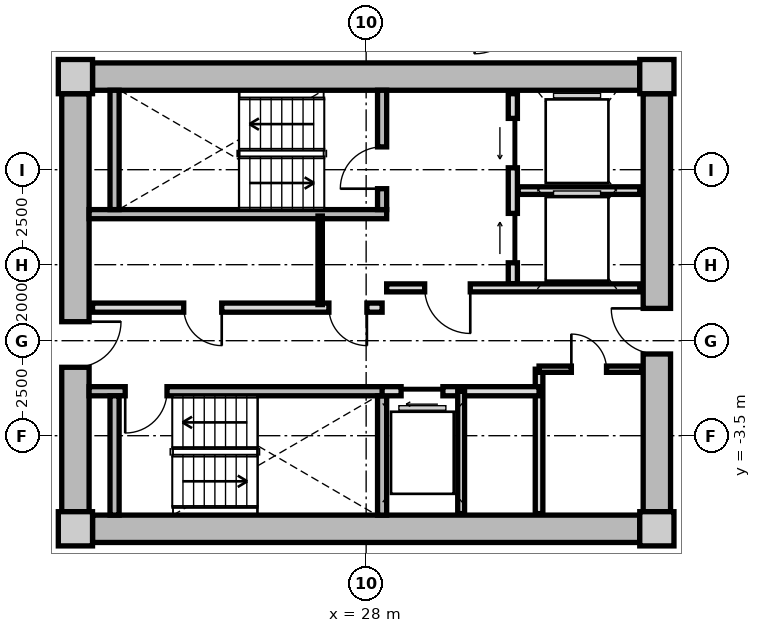
"""IFC4 building model, lengths in metres.
Left out: names, types, materials, properties, quantities, classifications, styles, units other than length and angle.
Written with IfcOpenShell. Run it as: python <this file> out.ifc"""

import sys

from ifc_helpers import new_model, si_unit, direction, frame, frame_2d, origin, origin_2d, place, context, subcontext, project, spatial, rectangle, extrude, source, transform, mapped, element, fill, save


model = new_model("IFC4")
c1 = context("Model", 3, precision=1e-05, world=origin(), true_north=direction((0.0, 1.0)))
c2 = subcontext(c1, "Body", "Model", "MODEL_VIEW")
j1 = project(units=[si_unit("LENGTHUNIT", "METRE"), si_unit("PLANEANGLEUNIT", "RADIAN")], contexts=[c1])
p1 = place(None, origin())
s1 = spatial("IfcSite", under=j1, at=p1, CompositionType="ELEMENT")
p2 = place(p1, origin())
s2 = spatial("IfcBuilding", under=s1, at=p2, CompositionType="ELEMENT")
p3 = place(p2, frame((0.0, 0.0, 120.65)))
s3 = spatial("IfcBuildingStorey", under=s2, at=p3, CompositionType="ELEMENT", Elevation=120.65)
m1 = source(origin(), c2, "Body", "SweptSolid", [
    extrude(rectangle(XDim=0.9, YDim=0.9, at=origin_2d()), origin(), (0.0, 0.0, 1.0), 3.05),
])
for number, where, z_axis, x_axis in (
    (1, (20.35, -5.95, 0.0), (0.0, 0.0, 1.0), (1.0, 0.0, 0.0)),
    (2, (35.65, -5.95, 0.0), (0.0, 0.0, 1.0), (1.0, 0.0, 0.0)),
    (3, (35.65, 5.95, 0.0), (0.0, 0.0, 1.0), (1.0, 0.0, 0.0)),
    (4, (20.35, 5.95, 0.0), (0.0, 0.0, 1.0), (1.0, 0.0, 0.0)),
):
    element("IfcColumn", number, at=place(p3, frame(where, z_axis=z_axis, x_axis=x_axis)), inside=s3, PredefinedType="COLUMN", context=c2, shape_type="MappedRepresentation", body=[
        mapped(m1, transform((0.0, 0.0, 0.0), x_axis=(1.0, 0.0, 0.0), y_axis=(0.0, 1.0, 0.0), z_axis=(0.0, 0.0, 1.0), scale=1.0)),
    ])
m2 = source(origin(), c2, "Body", "SweptSolid", [
    extrude(rectangle(XDim=14.4, YDim=0.72, at=frame_2d((7.2, 0.0))), origin(), (0.0, 0.0, 1.0), 2.79),
])
for number, where, z_axis, x_axis in (
    (5, (20.8, 5.95, 0.0), (0.0, 0.0, 1.0), (1.0, 0.0, 0.0)),
    (6, (35.2, -5.95, 0.0), (0.0, 0.0, 1.0), (-1.0, 0.0, 0.0)),
):
    element("IfcWall", number, at=place(p3, frame(where, z_axis=z_axis, x_axis=x_axis)), inside=s3, PredefinedType="SHEAR", context=c2, shape_type="MappedRepresentation", body=[
        mapped(m2, transform((0.0, 0.0, 0.0), x_axis=(1.0, 0.0, 0.0), y_axis=(0.0, 1.0, 0.0), z_axis=(0.0, 0.0, 1.0), scale=1.0)),
    ])
m3 = source(origin(), c2, "Body", "SweptSolid", [
    extrude(rectangle(XDim=11.0, YDim=0.72, at=frame_2d((5.5, 0.0))), origin(), (0.0, 0.0, 1.0), 2.79),
])
p4 = place(p3, frame((20.35, -5.5, 0.0), z_axis=(0.0, 0.0, 1.0), x_axis=(0.0, 1.0, 0.0)))
e7 = element("IfcWall", 7, at=p4, inside=s3, PredefinedType="SHEAR", context=c2, shape_type="MappedRepresentation", body=[
    mapped(m3, transform((0.0, 0.0, 0.0), x_axis=(1.0, 0.0, 0.0), y_axis=(0.0, 1.0, 0.0), z_axis=(0.0, 0.0, 1.0), scale=1.0)),
])
p5 = place(p4, frame((3.8, 0.0, 0.0)))
e8 = element("IfcOpeningElement", 8, at=p5, cuts=e7, PredefinedType="OPENING", context=c2, shape_type="SweptSolid", body=[
    extrude(rectangle(XDim=1.2, YDim=2.15, at=frame_2d((0.6, 1.075))), frame((0.0, 0.37, 0.0), z_axis=(0.0, -1.0, 0.0), x_axis=(1.0, 0.0, 0.0)), (0.0, 0.0, 1.0), 0.74),
])
p6 = place(p3, frame((35.65, 5.5, 0.0), z_axis=(0.0, 0.0, 1.0), x_axis=(0.0, -1.0, 0.0)))
e9 = element("IfcWall", 9, at=p6, inside=s3, PredefinedType="SHEAR", context=c2, shape_type="MappedRepresentation", body=[
    mapped(m3, transform((0.0, 0.0, 0.0), x_axis=(1.0, 0.0, 0.0), y_axis=(0.0, 1.0, 0.0), z_axis=(0.0, 0.0, 1.0), scale=1.0)),
])
p7 = place(p6, frame((5.65, 0.0, 0.0)))
e10 = element("IfcOpeningElement", 10, at=p7, cuts=e9, PredefinedType="OPENING", context=c2, shape_type="SweptSolid", body=[
    extrude(rectangle(XDim=1.2, YDim=2.15, at=frame_2d((0.6, 1.075))), frame((0.0, 0.37, 0.0), z_axis=(0.0, -1.0, 0.0), x_axis=(1.0, 0.0, 0.0)), (0.0, 0.0, 1.0), 0.74),
])
m4 = source(origin(), c2, "Body", "SweptSolid", [
    extrude(rectangle(XDim=7.83, YDim=0.24, at=frame_2d((3.915, 0.0))), origin(), (0.0, 0.0, 1.0), 2.79),
])
p8 = place(p3, frame((20.71, 2.33, 0.0), z_axis=(0.0, 0.0, 1.0), x_axis=(1.0, 0.0, 0.0)))
e11 = element("IfcWall", 11, at=p8, inside=s3, PredefinedType="PARTITIONING", context=c2, shape_type="MappedRepresentation", body=[
    mapped(m4, transform((0.0, 0.0, 0.0), x_axis=(1.0, 0.0, 0.0), y_axis=(0.0, 1.0, 0.0), z_axis=(0.0, 0.0, 1.0), scale=1.0)),
])
m5 = source(origin(), c2, "Body", "SweptSolid", [
    extrude(rectangle(XDim=3.14, YDim=0.24, at=frame_2d((1.57, 0.0))), origin(), (0.0, 0.0, 1.0), 2.79),
])
p9 = place(p3, frame((21.38, 2.45, 0.0), z_axis=(0.0, 0.0, 1.0), x_axis=(0.0, 1.0, 0.0)))
e12 = element("IfcWall", 12, at=p9, inside=s3, PredefinedType="PARTITIONING", context=c2, shape_type="MappedRepresentation", body=[
    mapped(m5, transform((0.0, 0.0, 0.0), x_axis=(1.0, 0.0, 0.0), y_axis=(0.0, 1.0, 0.0), z_axis=(0.0, 0.0, 1.0), scale=1.0)),
])
p10 = place(p3, frame((28.42, 2.45, 0.0), z_axis=(0.0, 0.0, 1.0), x_axis=(0.0, 1.0, 0.0)))
e13 = element("IfcWall", 13, at=p10, inside=s3, PredefinedType="PARTITIONING", context=c2, shape_type="MappedRepresentation", body=[
    mapped(m5, transform((0.0, 0.0, 0.0), x_axis=(1.0, 0.0, 0.0), y_axis=(0.0, 1.0, 0.0), z_axis=(0.0, 0.0, 1.0), scale=1.0)),
])
p11 = place(p10, frame((0.55, 0.0, 0.0)))
e14 = element("IfcOpeningElement", 14, at=p11, cuts=e13, PredefinedType="OPENING", context=c2, shape_type="SweptSolid", body=[
    extrude(rectangle(XDim=1.1, YDim=2.15, at=frame_2d((0.55, 1.075))), frame((0.0, 0.13, 0.0), z_axis=(0.0, -1.0, 0.0), x_axis=(1.0, 0.0, 0.0)), (0.0, 0.0, 1.0), 0.26),
])
p12 = place(p3, frame((20.71, -2.33, 0.0), z_axis=(0.0, 0.0, 1.0), x_axis=(1.0, 0.0, 0.0)))
e15 = element("IfcWall", 15, at=p12, inside=s3, PredefinedType="PARTITIONING", context=c2, shape_type="MappedRepresentation", body=[
    mapped(m4, transform((0.0, 0.0, 0.0), x_axis=(1.0, 0.0, 0.0), y_axis=(0.0, 1.0, 0.0), z_axis=(0.0, 0.0, 1.0), scale=1.0)),
])
p13 = place(p12, frame((0.95, 0.0, 0.0)))
e16 = element("IfcOpeningElement", 16, at=p13, cuts=e15, PredefinedType="OPENING", context=c2, shape_type="SweptSolid", body=[
    extrude(rectangle(XDim=1.1, YDim=2.15, at=frame_2d((0.55, 1.075))), frame((0.0, 0.13, 0.0), z_axis=(0.0, -1.0, 0.0), x_axis=(1.0, 0.0, 0.0)), (0.0, 0.0, 1.0), 0.26),
])
for number, where, z_axis, x_axis in (
    (17, (21.38, -5.59, 0.0), (0.0, 0.0, 1.0), (0.0, 1.0, 0.0)),
    (18, (28.42, -5.59, 0.0), (0.0, 0.0, 1.0), (0.0, 1.0, 0.0)),
):
    element("IfcWall", number, at=place(p3, frame(where, z_axis=z_axis, x_axis=x_axis)), inside=s3, PredefinedType="PARTITIONING", context=c2, shape_type="MappedRepresentation", body=[
        mapped(m5, transform((0.0, 0.0, 0.0), x_axis=(1.0, 0.0, 0.0), y_axis=(0.0, 1.0, 0.0), z_axis=(0.0, 0.0, 1.0), scale=1.0)),
    ])
m6 = source(origin(), c2, "Body", "SweptSolid", [
    extrude(rectangle(XDim=5.0, YDim=0.24, at=frame_2d((2.5, 0.0))), origin(), (0.0, 0.0, 1.0), 2.775),
])
p14 = place(p3, frame((31.86, 0.5, 0.0), z_axis=(0.0, 0.0, 1.0), x_axis=(0.0, 1.0, 0.0)))
e19 = element("IfcWall", 19, at=p14, inside=s3, PredefinedType="PARTITIONING", context=c2, shape_type="MappedRepresentation", body=[
    mapped(m6, transform((0.0, 0.0, 0.0), x_axis=(1.0, 0.0, 0.0), y_axis=(0.0, 1.0, 0.0), z_axis=(0.0, 0.0, 1.0), scale=1.0)),
])
p15 = place(p14, frame((3.05, 0.0, 0.0)))
e20 = element("IfcOpeningElement", 20, at=p15, cuts=e19, PredefinedType="OPENING", context=c2, shape_type="SweptSolid", body=[
    extrude(rectangle(XDim=1.3, YDim=2.2, at=frame_2d((0.65, 1.1))), frame((0.0, 0.13, 0.0), z_axis=(0.0, -1.0, 0.0), x_axis=(1.0, 0.0, 0.0)), (0.0, 0.0, 1.0), 0.26),
])
p16 = place(p14, frame((0.55, 0.0, 0.0)))
e21 = element("IfcOpeningElement", 21, at=p16, cuts=e19, PredefinedType="OPENING", context=c2, shape_type="SweptSolid", body=[
    extrude(rectangle(XDim=1.3, YDim=2.2, at=frame_2d((0.65, 1.1))), frame((0.0, 0.13, 0.0), z_axis=(0.0, -1.0, 0.0), x_axis=(1.0, 0.0, 0.0)), (0.0, 0.0, 1.0), 0.26),
])
m7 = source(origin(), c2, "Body", "SweptSolid", [
    extrude(rectangle(XDim=3.2, YDim=0.2, at=frame_2d((1.6, 0.0))), origin(), (0.0, 0.0, 1.0), 2.775),
])
p17 = place(p3, frame((32.0, 2.95, 0.0), z_axis=(0.0, 0.0, 1.0), x_axis=(1.0, 0.0, 0.0)))
e22 = element("IfcWall", 22, at=p17, inside=s3, PredefinedType="PARTITIONING", context=c2, shape_type="MappedRepresentation", body=[
    mapped(m7, transform((0.0, 0.0, 0.0), x_axis=(1.0, 0.0, 0.0), y_axis=(0.0, 1.0, 0.0), z_axis=(0.0, 0.0, 1.0), scale=1.0)),
])
m8 = source(origin(), c2, "Body", "SweptSolid", [
    extrude(rectangle(XDim=6.66, YDim=0.21, at=frame_2d((3.33, 0.0))), origin(), (0.0, 0.0, 1.0), 2.775),
])
p18 = place(p3, frame((28.54, 0.39, 0.0), z_axis=(0.0, 0.0, 1.0), x_axis=(1.0, 0.0, 0.0)))
e23 = element("IfcWall", 23, at=p18, inside=s3, PredefinedType="PARTITIONING", context=c2, shape_type="MappedRepresentation", body=[
    mapped(m8, transform((0.0, 0.0, 0.0), x_axis=(1.0, 0.0, 0.0), y_axis=(0.0, 1.0, 0.0), z_axis=(0.0, 0.0, 1.0), scale=1.0)),
])
p19 = place(p18, frame((1.0, 0.0, 0.0)))
e24 = element("IfcOpeningElement", 24, at=p19, cuts=e23, PredefinedType="OPENING", context=c2, shape_type="SweptSolid", body=[
    extrude(rectangle(XDim=1.2, YDim=2.15, at=frame_2d((0.6, 1.075))), frame((0.0, 0.115, 0.0), z_axis=(0.0, -1.0, 0.0), x_axis=(1.0, 0.0, 0.0)), (0.0, 0.0, 1.0), 0.23),
])
m9 = source(origin(), c2, "Body", "SweptSolid", [
    extrude(rectangle(XDim=7.62, YDim=0.24, at=frame_2d((3.81, 0.0))), origin(), (0.0, 0.0, 1.0), 2.775),
])
p20 = place(p3, frame((20.8, -0.13, 0.0), z_axis=(0.0, 0.0, 1.0), x_axis=(1.0, 0.0, 0.0)))
e25 = element("IfcWall", 25, at=p20, inside=s3, PredefinedType="PARTITIONING", context=c2, shape_type="MappedRepresentation", body=[
    mapped(m9, transform((0.0, 0.0, 0.0), x_axis=(1.0, 0.0, 0.0), y_axis=(0.0, 1.0, 0.0), z_axis=(0.0, 0.0, 1.0), scale=1.0)),
])
p21 = place(p20, frame((6.22, 0.0, 0.0)))
e26 = element("IfcOpeningElement", 26, at=p21, cuts=e25, PredefinedType="OPENING", context=c2, shape_type="SweptSolid", body=[
    extrude(rectangle(XDim=1.0, YDim=2.1, at=frame_2d((0.5, 1.05))), frame((0.0, 0.13, 0.0), z_axis=(0.0, -1.0, 0.0), x_axis=(1.0, 0.0, 0.0)), (0.0, 0.0, 1.0), 0.26),
])
p22 = place(p20, frame((2.4, 0.0, 0.0)))
e27 = element("IfcOpeningElement", 27, at=p22, cuts=e25, PredefinedType="OPENING", context=c2, shape_type="SweptSolid", body=[
    extrude(rectangle(XDim=1.0, YDim=2.1, at=frame_2d((0.5, 1.05))), frame((0.0, 0.13, 0.0), z_axis=(0.0, -1.0, 0.0), x_axis=(1.0, 0.0, 0.0)), (0.0, 0.0, 1.0), 0.26),
])
m10 = source(origin(), c2, "Body", "SweptSolid", [
    extrude(rectangle(XDim=2.33, YDim=0.115, at=frame_2d((1.165, 0.0))), origin(), (0.0, 0.0, 1.0), 2.775),
])
p23 = place(p3, frame((26.79, -0.05, 0.0), z_axis=(0.0, 0.0, 1.0), x_axis=(0.0, 1.0, 0.0)))
e28 = element("IfcWall", 28, at=p23, inside=s3, PredefinedType="PARTITIONING", context=c2, shape_type="MappedRepresentation", body=[
    mapped(m10, transform((0.0, 0.0, 0.0), x_axis=(1.0, 0.0, 0.0), y_axis=(0.0, 1.0, 0.0), z_axis=(0.0, 0.0, 1.0), scale=1.0)),
])
m11 = source(origin(), c2, "Body", "SweptSolid", [
    extrude(rectangle(XDim=3.8, YDim=0.2, at=frame_2d((1.9, 0.0))), origin(), (0.0, 0.0, 1.0), 2.775),
])
p24 = place(p3, frame((32.55, -5.55, 0.0), z_axis=(0.0, 0.0, 1.0), x_axis=(0.0, 1.0, 0.0)))
e29 = element("IfcWall", 29, at=p24, inside=s3, PredefinedType="PARTITIONING", context=c2, shape_type="MappedRepresentation", body=[
    mapped(m11, transform((0.0, 0.0, 0.0), x_axis=(1.0, 0.0, 0.0), y_axis=(0.0, 1.0, 0.0), z_axis=(0.0, 0.0, 1.0), scale=1.0)),
])
m12 = source(origin(), c2, "Body", "SweptSolid", [
    extrude(rectangle(XDim=4.13, YDim=0.24, at=frame_2d((2.065, 0.0))), origin(), (0.0, 0.0, 1.0), 2.775),
])
p25 = place(p3, frame((28.42, -2.33, 0.0), z_axis=(0.0, 0.0, 1.0), x_axis=(1.0, 0.0, 0.0)))
e30 = element("IfcWall", 30, at=p25, inside=s3, PredefinedType="PARTITIONING", context=c2, shape_type="MappedRepresentation", body=[
    mapped(m12, transform((0.0, 0.0, 0.0), x_axis=(1.0, 0.0, 0.0), y_axis=(0.0, 1.0, 0.0), z_axis=(0.0, 0.0, 1.0), scale=1.0)),
])
p26 = place(p25, frame((0.5, 0.0, 0.0)))
e31 = element("IfcOpeningElement", 31, at=p26, cuts=e30, PredefinedType="OPENING", context=c2, shape_type="SweptSolid", body=[
    extrude(rectangle(XDim=1.1, YDim=2.2, at=frame_2d((0.55, 1.1))), frame((0.0, 0.13, 0.0), z_axis=(0.0, -1.0, 0.0), x_axis=(1.0, 0.0, 0.0)), (0.0, 0.0, 1.0), 0.26),
])
m13 = source(origin(), c2, "Body", "SweptSolid", [
    extrude(rectangle(XDim=3.22, YDim=0.18, at=frame_2d((1.61, 0.0))), origin(), (0.0, 0.0, 1.0), 2.775),
])
p27 = place(p3, frame((30.5, -5.55, 0.0), z_axis=(0.0, 0.0, 1.0), x_axis=(0.0, 1.0, 0.0)))
e32 = element("IfcWall", 32, at=p27, inside=s3, PredefinedType="PARTITIONING", context=c2, shape_type="MappedRepresentation", body=[
    mapped(m13, transform((0.0, 0.0, 0.0), x_axis=(1.0, 0.0, 0.0), y_axis=(0.0, 1.0, 0.0), z_axis=(0.0, 0.0, 1.0), scale=1.0)),
])
m14 = source(origin(), c2, "Body", "SweptSolid", [
    extrude(rectangle(XDim=2.7, YDim=0.165, at=frame_2d((1.35, 0.0))), origin(), (0.0, 0.0, 1.0), 2.775),
])
p28 = place(p3, frame((32.55, -1.75, 0.0), z_axis=(0.0, 0.0, 1.0), x_axis=(1.0, 0.0, 0.0)))
e33 = element("IfcWall", 33, at=p28, inside=s3, PredefinedType="PARTITIONING", context=c2, shape_type="MappedRepresentation", body=[
    mapped(m14, transform((0.0, 0.0, 0.0), x_axis=(1.0, 0.0, 0.0), y_axis=(0.0, 1.0, 0.0), z_axis=(0.0, 0.0, 1.0), scale=1.0)),
])
p29 = place(p28, frame((0.85, 0.0, 0.0)))
e34 = element("IfcOpeningElement", 34, at=p29, cuts=e33, PredefinedType="OPENING", context=c2, shape_type="SweptSolid", body=[
    extrude(rectangle(XDim=0.925, YDim=2.1, at=frame_2d((0.462, 1.05))), frame((0.0, 0.093, 0.0), z_axis=(0.0, -1.0, 0.0), x_axis=(1.0, 0.0, 0.0)), (0.0, 0.0, 1.0), 0.185),
])
m15 = source(origin(), c2, "Body", "SweptSolid", [
    extrude(rectangle(XDim=1.1, YDim=2.15, at=frame_2d((0.55, 1.075))), frame((0.0, 0.025, 0.0), z_axis=(0.0, -1.0, 0.0), x_axis=(1.0, 0.0, 0.0)), (0.0, 0.0, 1.0), 0.05),
])
p30 = place(p11, origin())
e35 = element("IfcDoor", 35, at=p30, inside=s3, OperationType="SINGLE_SWING_LEFT", PredefinedType="DOOR", context=c2, shape_type="MappedRepresentation", body=[
    mapped(m15, transform((0.0, 0.0, 0.0), x_axis=(1.0, 0.0, 0.0), y_axis=(0.0, 1.0, 0.0), z_axis=(0.0, 0.0, 1.0), scale=1.0)),
])
fill(e14, e35)
p31 = place(p13, frame((1.1, 0.0, 0.0), z_axis=(0.0, 0.0, 1.0), x_axis=(-1.0, 0.0, 0.0)))
e36 = element("IfcDoor", 36, at=p31, inside=s3, OperationType="SINGLE_SWING_RIGHT", PredefinedType="DOOR", context=c2, shape_type="MappedRepresentation", body=[
    mapped(m15, transform((0.0, 0.0, 0.0), x_axis=(1.0, 0.0, 0.0), y_axis=(0.0, 1.0, 0.0), z_axis=(0.0, 0.0, 1.0), scale=1.0)),
])
fill(e16, e36)
m16 = source(origin(), c2, "Body", "SweptSolid", [
    extrude(rectangle(XDim=1.3, YDim=2.2, at=frame_2d((0.65, 1.1))), frame((0.0, 0.025, 0.0), z_axis=(0.0, -1.0, 0.0), x_axis=(1.0, 0.0, 0.0)), (0.0, 0.0, 1.0), 0.05),
])
p32 = place(p15, origin())
e37 = element("IfcDoor", 37, at=p32, inside=s3, OperationType="SLIDING_TO_LEFT", PredefinedType="DOOR", context=c2, shape_type="MappedRepresentation", body=[
    mapped(m16, transform((0.0, 0.0, 0.0), x_axis=(1.0, 0.0, 0.0), y_axis=(0.0, 1.0, 0.0), z_axis=(0.0, 0.0, 1.0), scale=1.0)),
])
fill(e20, e37)
p33 = place(p16, origin())
e38 = element("IfcDoor", 38, at=p33, inside=s3, OperationType="SLIDING_TO_RIGHT", PredefinedType="DOOR", context=c2, shape_type="MappedRepresentation", body=[
    mapped(m16, transform((0.0, 0.0, 0.0), x_axis=(1.0, 0.0, 0.0), y_axis=(0.0, 1.0, 0.0), z_axis=(0.0, 0.0, 1.0), scale=1.0)),
])
fill(e21, e38)
m17 = source(origin(), c2, "Body", "SweptSolid", [
    extrude(rectangle(XDim=1.2, YDim=2.15, at=frame_2d((0.6, 1.075))), frame((0.0, 0.025, 0.0), z_axis=(0.0, -1.0, 0.0), x_axis=(1.0, 0.0, 0.0)), (0.0, 0.0, 1.0), 0.05),
])
p34 = place(p19, frame((1.2, 0.0, 0.0), z_axis=(0.0, 0.0, 1.0), x_axis=(-1.0, 0.0, 0.0)))
e39 = element("IfcDoor", 39, at=p34, inside=s3, OperationType="SINGLE_SWING_LEFT", PredefinedType="DOOR", context=c2, shape_type="MappedRepresentation", body=[
    mapped(m17, transform((0.0, 0.0, 0.0), x_axis=(1.0, 0.0, 0.0), y_axis=(0.0, 1.0, 0.0), z_axis=(0.0, 0.0, 1.0), scale=1.0)),
])
fill(e24, e39)
p35 = place(p5, frame((1.2, 0.0, 0.0), z_axis=(0.0, 0.0, 1.0), x_axis=(-1.0, 0.0, 0.0)))
e40 = element("IfcDoor", 40, at=p35, inside=s3, OperationType="SINGLE_SWING_LEFT", PredefinedType="DOOR", context=c2, shape_type="MappedRepresentation", body=[
    mapped(m17, transform((0.0, 0.0, 0.0), x_axis=(1.0, 0.0, 0.0), y_axis=(0.0, 1.0, 0.0), z_axis=(0.0, 0.0, 1.0), scale=1.0)),
])
fill(e8, e40)
p36 = place(p7, frame((1.2, 0.0, 0.0), z_axis=(0.0, 0.0, 1.0), x_axis=(-1.0, 0.0, 0.0)))
e41 = element("IfcDoor", 41, at=p36, inside=s3, OperationType="SINGLE_SWING_RIGHT", PredefinedType="DOOR", context=c2, shape_type="MappedRepresentation", body=[
    mapped(m17, transform((0.0, 0.0, 0.0), x_axis=(1.0, 0.0, 0.0), y_axis=(0.0, 1.0, 0.0), z_axis=(0.0, 0.0, 1.0), scale=1.0)),
])
fill(e10, e41)
m18 = source(origin(), c2, "Body", "SweptSolid", [
    extrude(rectangle(XDim=1.0, YDim=2.1, at=frame_2d((0.5, 1.05))), frame((0.0, 0.025, 0.0), z_axis=(0.0, -1.0, 0.0), x_axis=(1.0, 0.0, 0.0)), (0.0, 0.0, 1.0), 0.05),
])
p37 = place(p21, frame((1.0, 0.0, 0.0), z_axis=(0.0, 0.0, 1.0), x_axis=(-1.0, 0.0, 0.0)))
e42 = element("IfcDoor", 42, at=p37, inside=s3, OperationType="SINGLE_SWING_LEFT", PredefinedType="DOOR", context=c2, shape_type="MappedRepresentation", body=[
    mapped(m18, transform((0.0, 0.0, 0.0), x_axis=(1.0, 0.0, 0.0), y_axis=(0.0, 1.0, 0.0), z_axis=(0.0, 0.0, 1.0), scale=1.0)),
])
fill(e26, e42)
p38 = place(p22, frame((1.0, 0.0, 0.0), z_axis=(0.0, 0.0, 1.0), x_axis=(-1.0, 0.0, 0.0)))
e43 = element("IfcDoor", 43, at=p38, inside=s3, OperationType="SINGLE_SWING_LEFT", PredefinedType="DOOR", context=c2, shape_type="MappedRepresentation", body=[
    mapped(m18, transform((0.0, 0.0, 0.0), x_axis=(1.0, 0.0, 0.0), y_axis=(0.0, 1.0, 0.0), z_axis=(0.0, 0.0, 1.0), scale=1.0)),
])
fill(e27, e43)
m19 = source(origin(), c2, "Body", "SweptSolid", [
    extrude(rectangle(XDim=1.1, YDim=2.2, at=frame_2d((0.55, 1.1))), frame((0.0, 0.025, 0.0), z_axis=(0.0, -1.0, 0.0), x_axis=(1.0, 0.0, 0.0)), (0.0, 0.0, 1.0), 0.05),
])
p39 = place(p26, frame((1.1, 0.0, 0.0), z_axis=(0.0, 0.0, 1.0), x_axis=(-1.0, 0.0, 0.0)))
e44 = element("IfcDoor", 44, at=p39, inside=s3, OperationType="SLIDING_TO_LEFT", PredefinedType="DOOR", context=c2, shape_type="MappedRepresentation", body=[
    mapped(m19, transform((0.0, 0.0, 0.0), x_axis=(1.0, 0.0, 0.0), y_axis=(0.0, 1.0, 0.0), z_axis=(0.0, 0.0, 1.0), scale=1.0)),
])
fill(e31, e44)
m20 = source(origin(), c2, "Body", "SweptSolid", [
    extrude(rectangle(XDim=0.925, YDim=2.1, at=frame_2d((0.462, 1.05))), frame((0.0, 0.025, 0.0), z_axis=(0.0, -1.0, 0.0), x_axis=(1.0, 0.0, 0.0)), (0.0, 0.0, 1.0), 0.05),
])
p40 = place(p29, origin())
e45 = element("IfcDoor", 45, at=p40, inside=s3, OperationType="SINGLE_SWING_LEFT", PredefinedType="DOOR", context=c2, shape_type="MappedRepresentation", body=[
    mapped(m20, transform((0.0, 0.0, 0.0), x_axis=(1.0, 0.0, 0.0), y_axis=(0.0, 1.0, 0.0), z_axis=(0.0, 0.0, 1.0), scale=1.0)),
])
fill(e34, e45)
save(model, sys.argv[1])
